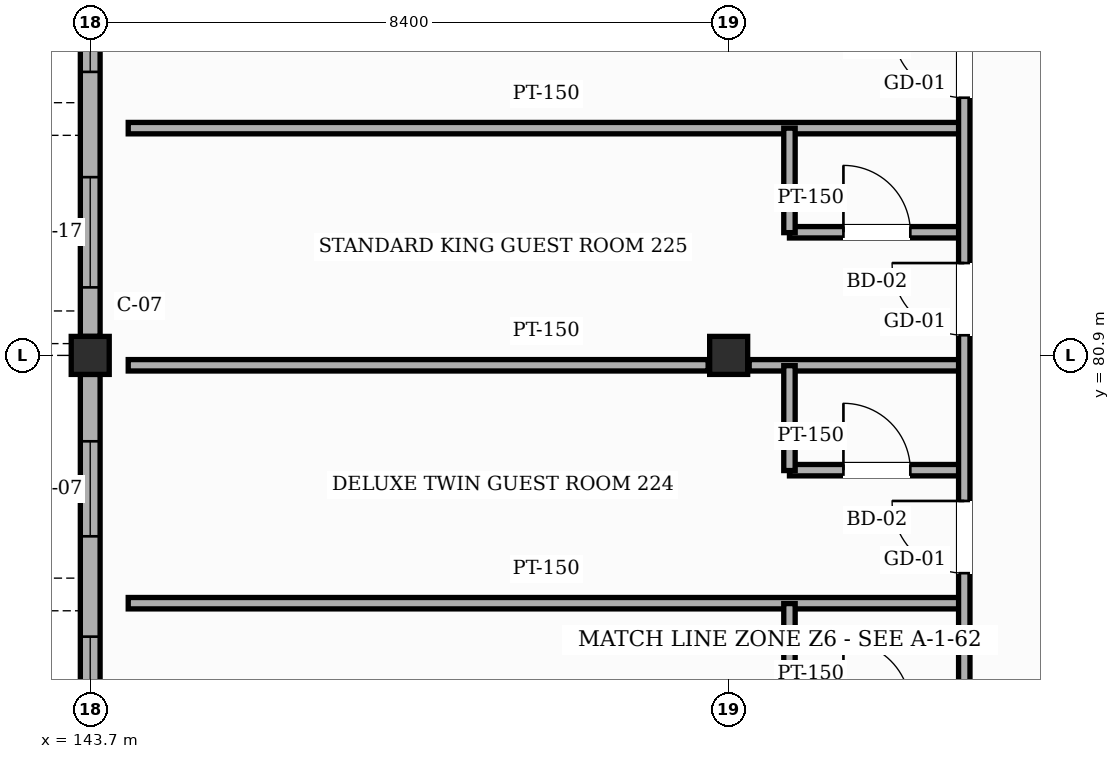
"""IFC4 building model, lengths in metres.
Left out: names, types, materials, properties, quantities, classifications, styles, units other than length and angle.
Written with IfcOpenShell. Run it as: python <this file> out.ifc"""

import sys

from ifc_helpers import new_model, si_unit, direction, frame, frame_2d, origin, origin_2d, place, context, subcontext, project, spatial, rectangle, hollow_rectangle, extrude, element, fill, save


model = new_model("IFC4")
c1 = context("Model", 3, precision=1e-05, world=origin(), true_north=direction((0.0, 1.0)))
c2 = subcontext(c1, "Body", "Model", "MODEL_VIEW")
j1 = project(units=[si_unit("LENGTHUNIT", "METRE"), si_unit("PLANEANGLEUNIT", "RADIAN")], contexts=[c1])
p1 = place(None, origin())
s1 = spatial("IfcSite", under=j1, at=p1, CompositionType="ELEMENT")
p2 = place(p1, origin())
s2 = spatial("IfcBuilding", under=s1, at=p2, CompositionType="ELEMENT")
p3 = place(p2, frame((0.0, 0.0, 35.4)))
s3 = spatial("IfcBuildingStorey", under=s2, at=p3, CompositionType="ELEMENT", Elevation=35.4)
for number, where, z_axis, x_axis in (
    (1, (143.7, 80.9, 0.0), (0.0, 0.0, 1.0), (1.0, 0.0, 0.0)),
    (2, (152.1, 80.9, 0.0), (0.0, 0.0, 1.0), (1.0, 0.0, 0.0)),
):
    element("IfcColumn", number, at=place(p3, frame(where, z_axis=z_axis, x_axis=x_axis)), inside=s3, PredefinedType="COLUMN", context=c2, shape_type="SweptSolid", body=[
        extrude(hollow_rectangle(XDim=0.5, YDim=0.5, WallThickness=0.022, InnerFilletRadius=0.022, OuterFilletRadius=0.044, at=origin_2d()), origin(), (0.0, 0.0, 1.0), 3.6),
    ])
p4 = place(p3, frame((143.7, 73.6, 0.0), z_axis=(0.0, 0.0, 1.0), x_axis=(0.0, 1.0, 0.0)))
e3 = element("IfcWall", 3, at=p4, inside=s3, PredefinedType="SOLIDWALL", context=c2, shape_type="SweptSolid", body=[
    extrude(rectangle(XDim=7.05, YDim=0.26, at=frame_2d((3.525, 0.0))), origin(), (0.0, 0.0, 1.0), 2.805),
])
p5 = place(p4, frame((1.35, 0.0, 0.85)))
e4 = element("IfcOpeningElement", 4, at=p5, cuts=e3, PredefinedType="OPENING", context=c2, shape_type="SweptSolid", body=[
    extrude(rectangle(XDim=2.25, YDim=1.35, at=frame_2d((1.125, 0.675))), frame((0.0, 0.14, 0.0), z_axis=(0.0, -1.0, 0.0), x_axis=(1.0, 0.0, 0.0)), (0.0, 0.0, 1.0), 0.28),
])
p6 = place(p4, frame((4.92, 0.0, 0.85)))
e5 = element("IfcOpeningElement", 5, at=p6, cuts=e3, PredefinedType="OPENING", context=c2, shape_type="SweptSolid", body=[
    extrude(rectangle(XDim=1.25, YDim=1.5, at=frame_2d((0.625, 0.75))), frame((0.0, 0.14, 0.0), z_axis=(0.0, -1.0, 0.0), x_axis=(1.0, 0.0, 0.0)), (0.0, 0.0, 1.0), 0.28),
])
p7 = place(p3, frame((143.7, 81.15, 0.0), z_axis=(0.0, 0.0, 1.0), x_axis=(0.0, 1.0, 0.0)))
e6 = element("IfcWall", 6, at=p7, inside=s3, PredefinedType="SOLIDWALL", context=c2, shape_type="SweptSolid", body=[
    extrude(rectangle(XDim=7.5, YDim=0.26, at=frame_2d((3.75, 0.0))), origin(), (0.0, 0.0, 1.0), 2.805),
])
p8 = place(p7, frame((0.645, 0.0, 0.85)))
e7 = element("IfcOpeningElement", 7, at=p8, cuts=e6, PredefinedType="OPENING", context=c2, shape_type="SweptSolid", body=[
    extrude(rectangle(XDim=1.45, YDim=1.5, at=frame_2d((0.725, 0.75))), frame((0.0, 0.14, 0.0), z_axis=(0.0, -1.0, 0.0), x_axis=(1.0, 0.0, 0.0)), (0.0, 0.0, 1.0), 0.28),
])
p9 = place(p7, frame((3.48, 0.0, 0.85)))
e8 = element("IfcOpeningElement", 8, at=p9, cuts=e6, PredefinedType="OPENING", context=c2, shape_type="SweptSolid", body=[
    extrude(rectangle(XDim=1.65, YDim=1.5, at=frame_2d((0.825, 0.75))), frame((0.0, 0.14, 0.0), z_axis=(0.0, -1.0, 0.0), x_axis=(1.0, 0.0, 0.0)), (0.0, 0.0, 1.0), 0.28),
])
p10 = place(p7, frame((6.26, 0.0, 0.85)))
e9 = element("IfcOpeningElement", 9, at=p10, cuts=e6, PredefinedType="OPENING", context=c2, shape_type="SweptSolid", body=[
    extrude(rectangle(XDim=0.85, YDim=1.35, at=frame_2d((0.425, 0.675))), frame((0.0, 0.14, 0.0), z_axis=(0.0, -1.0, 0.0), x_axis=(1.0, 0.0, 0.0)), (0.0, 0.0, 1.0), 0.28),
])
p11 = place(p3, frame((144.2, 77.64, 0.0), z_axis=(0.0, 0.0, 1.0), x_axis=(1.0, 0.0, 0.0)))
e10 = element("IfcWall", 10, at=p11, inside=s3, PredefinedType="PARTITIONING", context=c2, shape_type="SweptSolid", body=[
    extrude(rectangle(XDim=11.0, YDim=0.15, at=frame_2d((5.5, 0.0))), origin(), (0.0, 0.0, 1.0), 3.365),
])
p12 = place(p3, frame((152.9, 79.39, 0.0), z_axis=(0.0, 0.0, 1.0), x_axis=(1.0, 0.0, 0.0)))
e11 = element("IfcWall", 11, at=p12, inside=s3, PredefinedType="PARTITIONING", context=c2, shape_type="SweptSolid", body=[
    extrude(rectangle(XDim=2.3, YDim=0.15, at=frame_2d((1.15, 0.0))), origin(), (0.0, 0.0, 1.0), 3.365),
])
p13 = place(p12, frame((0.71, 0.0, 0.0)))
e12 = element("IfcOpeningElement", 12, at=p13, cuts=e11, PredefinedType="OPENING", context=c2, shape_type="SweptSolid", body=[
    extrude(rectangle(XDim=0.88, YDim=2.12, at=frame_2d((0.44, 1.06))), frame((0.0, 0.085, 0.0), z_axis=(0.0, -1.0, 0.0), x_axis=(1.0, 0.0, 0.0)), (0.0, 0.0, 1.0), 0.17),
])
p14 = place(p3, frame((144.2, 80.77, 0.0), z_axis=(0.0, 0.0, 1.0), x_axis=(1.0, 0.0, 0.0)))
e13 = element("IfcWall", 13, at=p14, inside=s3, PredefinedType="PARTITIONING", context=c2, shape_type="SweptSolid", body=[
    extrude(rectangle(XDim=7.63, YDim=0.15, at=frame_2d((3.815, 0.0))), origin(), (0.0, 0.0, 1.0), 2.755),
])
p15 = place(p3, frame((152.37, 80.77, 0.0), z_axis=(0.0, 0.0, 1.0), x_axis=(1.0, 0.0, 0.0)))
e14 = element("IfcWall", 14, at=p15, inside=s3, PredefinedType="PARTITIONING", context=c2, shape_type="SweptSolid", body=[
    extrude(rectangle(XDim=2.83, YDim=0.15, at=frame_2d((1.415, 0.0))), origin(), (0.0, 0.0, 1.0), 2.755),
])
p16 = place(p3, frame((152.9, 82.52, 0.0), z_axis=(0.0, 0.0, 1.0), x_axis=(1.0, 0.0, 0.0)))
e15 = element("IfcWall", 15, at=p16, inside=s3, PredefinedType="PARTITIONING", context=c2, shape_type="SweptSolid", body=[
    extrude(rectangle(XDim=2.3, YDim=0.15, at=frame_2d((1.15, 0.0))), origin(), (0.0, 0.0, 1.0), 3.365),
])
p17 = place(p16, frame((0.71, 0.0, 0.0)))
e16 = element("IfcOpeningElement", 16, at=p17, cuts=e15, PredefinedType="OPENING", context=c2, shape_type="SweptSolid", body=[
    extrude(rectangle(XDim=0.88, YDim=2.12, at=frame_2d((0.44, 1.06))), frame((0.0, 0.085, 0.0), z_axis=(0.0, -1.0, 0.0), x_axis=(1.0, 0.0, 0.0)), (0.0, 0.0, 1.0), 0.17),
])
p18 = place(p3, frame((144.2, 83.89, 0.0), z_axis=(0.0, 0.0, 1.0), x_axis=(1.0, 0.0, 0.0)))
e17 = element("IfcWall", 17, at=p18, inside=s3, PredefinedType="PARTITIONING", context=c2, shape_type="SweptSolid", body=[
    extrude(rectangle(XDim=11.0, YDim=0.15, at=frame_2d((5.5, 0.0))), origin(), (0.0, 0.0, 1.0), 3.365),
])
p19 = place(p3, frame((152.9, 76.26, 0.0), z_axis=(0.0, 0.0, 1.0), x_axis=(0.0, 1.0, 0.0)))
e18 = element("IfcWall", 18, at=p19, inside=s3, PredefinedType="PARTITIONING", context=c2, shape_type="SweptSolid", body=[
    extrude(rectangle(XDim=1.375, YDim=0.15, at=frame_2d((0.688, 0.0))), origin(), (0.0, 0.0, 1.0), 3.365),
])
p20 = place(p3, frame((152.9, 79.385, 0.0), z_axis=(0.0, 0.0, 1.0), x_axis=(0.0, 1.0, 0.0)))
e19 = element("IfcWall", 19, at=p20, inside=s3, PredefinedType="PARTITIONING", context=c2, shape_type="SweptSolid", body=[
    extrude(rectangle(XDim=1.38, YDim=0.15, at=frame_2d((0.69, 0.0))), origin(), (0.0, 0.0, 1.0), 3.365),
])
p21 = place(p3, frame((152.9, 82.515, 0.0), z_axis=(0.0, 0.0, 1.0), x_axis=(0.0, 1.0, 0.0)))
e20 = element("IfcWall", 20, at=p21, inside=s3, PredefinedType="PARTITIONING", context=c2, shape_type="SweptSolid", body=[
    extrude(rectangle(XDim=1.375, YDim=0.15, at=frame_2d((0.688, 0.0))), origin(), (0.0, 0.0, 1.0), 3.365),
])
p22 = place(p3, frame((155.2, 62.0, 0.0), z_axis=(0.0, 0.0, 1.0), x_axis=(0.0, 1.0, 0.0)))
e21 = element("IfcWall", 21, at=p22, inside=s3, PredefinedType="PARTITIONING", context=c2, shape_type="SweptSolid", body=[
    extrude(rectangle(XDim=34.4, YDim=0.15, at=frame_2d((17.2, 0.0))), origin(), (0.0, 0.0, 1.0), 3.365),
])
p23 = place(p22, frame((0.325, 0.0, 0.0)))
e22 = element("IfcOpeningElement", 22, at=p23, cuts=e21, PredefinedType="OPENING", context=c2, shape_type="SweptSolid", body=[
    extrude(rectangle(XDim=1.1, YDim=2.2, at=frame_2d((0.55, 1.1))), frame((0.0, 0.085, 0.0), z_axis=(0.0, -1.0, 0.0), x_axis=(1.0, 0.0, 0.0)), (0.0, 0.0, 1.0), 0.17),
])
p24 = place(p22, frame((3.525, 0.0, 0.0)))
e23 = element("IfcOpeningElement", 23, at=p24, cuts=e21, PredefinedType="OPENING", context=c2, shape_type="SweptSolid", body=[
    extrude(rectangle(XDim=0.95, YDim=2.15, at=frame_2d((0.475, 1.075))), frame((0.0, 0.085, 0.0), z_axis=(0.0, -1.0, 0.0), x_axis=(1.0, 0.0, 0.0)), (0.0, 0.0, 1.0), 0.17),
])
p25 = place(p22, frame((6.655, 0.0, 0.0)))
e24 = element("IfcOpeningElement", 24, at=p25, cuts=e21, PredefinedType="OPENING", context=c2, shape_type="SweptSolid", body=[
    extrude(rectangle(XDim=0.95, YDim=2.15, at=frame_2d((0.475, 1.075))), frame((0.0, 0.085, 0.0), z_axis=(0.0, -1.0, 0.0), x_axis=(1.0, 0.0, 0.0)), (0.0, 0.0, 1.0), 0.17),
])
p26 = place(p22, frame((9.78, 0.0, 0.0)))
e25 = element("IfcOpeningElement", 25, at=p26, cuts=e21, PredefinedType="OPENING", context=c2, shape_type="SweptSolid", body=[
    extrude(rectangle(XDim=0.95, YDim=2.15, at=frame_2d((0.475, 1.075))), frame((0.0, 0.085, 0.0), z_axis=(0.0, -1.0, 0.0), x_axis=(1.0, 0.0, 0.0)), (0.0, 0.0, 1.0), 0.17),
])
p27 = place(p22, frame((12.91, 0.0, 0.0)))
e26 = element("IfcOpeningElement", 26, at=p27, cuts=e21, PredefinedType="OPENING", context=c2, shape_type="SweptSolid", body=[
    extrude(rectangle(XDim=0.95, YDim=2.15, at=frame_2d((0.475, 1.075))), frame((0.0, 0.085, 0.0), z_axis=(0.0, -1.0, 0.0), x_axis=(1.0, 0.0, 0.0)), (0.0, 0.0, 1.0), 0.17),
])
p28 = place(p22, frame((16.035, 0.0, 0.0)))
e27 = element("IfcOpeningElement", 27, at=p28, cuts=e21, PredefinedType="OPENING", context=c2, shape_type="SweptSolid", body=[
    extrude(rectangle(XDim=0.95, YDim=2.15, at=frame_2d((0.475, 1.075))), frame((0.0, 0.085, 0.0), z_axis=(0.0, -1.0, 0.0), x_axis=(1.0, 0.0, 0.0)), (0.0, 0.0, 1.0), 0.17),
])
p29 = place(p22, frame((19.165, 0.0, 0.0)))
e28 = element("IfcOpeningElement", 28, at=p29, cuts=e21, PredefinedType="OPENING", context=c2, shape_type="SweptSolid", body=[
    extrude(rectangle(XDim=0.95, YDim=2.15, at=frame_2d((0.475, 1.075))), frame((0.0, 0.085, 0.0), z_axis=(0.0, -1.0, 0.0), x_axis=(1.0, 0.0, 0.0)), (0.0, 0.0, 1.0), 0.17),
])
p30 = place(p22, frame((22.29, 0.0, 0.0)))
e29 = element("IfcOpeningElement", 29, at=p30, cuts=e21, PredefinedType="OPENING", context=c2, shape_type="SweptSolid", body=[
    extrude(rectangle(XDim=0.95, YDim=2.15, at=frame_2d((0.475, 1.075))), frame((0.0, 0.085, 0.0), z_axis=(0.0, -1.0, 0.0), x_axis=(1.0, 0.0, 0.0)), (0.0, 0.0, 1.0), 0.17),
])
p31 = place(p22, frame((25.42, 0.0, 0.0)))
e30 = element("IfcOpeningElement", 30, at=p31, cuts=e21, PredefinedType="OPENING", context=c2, shape_type="SweptSolid", body=[
    extrude(rectangle(XDim=0.95, YDim=2.15, at=frame_2d((0.475, 1.075))), frame((0.0, 0.085, 0.0), z_axis=(0.0, -1.0, 0.0), x_axis=(1.0, 0.0, 0.0)), (0.0, 0.0, 1.0), 0.17),
])
p32 = place(p22, frame((28.545, 0.0, 0.0)))
e31 = element("IfcOpeningElement", 31, at=p32, cuts=e21, PredefinedType="OPENING", context=c2, shape_type="SweptSolid", body=[
    extrude(rectangle(XDim=0.95, YDim=2.15, at=frame_2d((0.475, 1.075))), frame((0.0, 0.085, 0.0), z_axis=(0.0, -1.0, 0.0), x_axis=(1.0, 0.0, 0.0)), (0.0, 0.0, 1.0), 0.17),
])
p33 = place(p22, frame((31.675, 0.0, 0.0)))
e32 = element("IfcOpeningElement", 32, at=p33, cuts=e21, PredefinedType="OPENING", context=c2, shape_type="SweptSolid", body=[
    extrude(rectangle(XDim=0.95, YDim=2.15, at=frame_2d((0.475, 1.075))), frame((0.0, 0.085, 0.0), z_axis=(0.0, -1.0, 0.0), x_axis=(1.0, 0.0, 0.0)), (0.0, 0.0, 1.0), 0.17),
])
p34 = place(p5, origin())
e33 = element("IfcWindow", 33, at=p34, inside=s3, PartitioningType="SINGLE_PANEL", PredefinedType="WINDOW", context=c2, shape_type="SweptSolid", body=[
    extrude(rectangle(XDim=2.25, YDim=1.35, at=frame_2d((1.125, 0.675))), frame((0.0, 0.03, 0.0), z_axis=(0.0, -1.0, 0.0), x_axis=(1.0, 0.0, 0.0)), (0.0, 0.0, 1.0), 0.06),
])
fill(e4, e33)
p35 = place(p6, origin())
e34 = element("IfcWindow", 34, at=p35, inside=s3, PartitioningType="SINGLE_PANEL", PredefinedType="WINDOW", context=c2, shape_type="SweptSolid", body=[
    extrude(rectangle(XDim=1.25, YDim=1.5, at=frame_2d((0.625, 0.75))), frame((0.0, 0.03, 0.0), z_axis=(0.0, -1.0, 0.0), x_axis=(1.0, 0.0, 0.0)), (0.0, 0.0, 1.0), 0.06),
])
fill(e5, e34)
p36 = place(p8, origin())
e35 = element("IfcWindow", 35, at=p36, inside=s3, PartitioningType="SINGLE_PANEL", PredefinedType="WINDOW", context=c2, shape_type="SweptSolid", body=[
    extrude(rectangle(XDim=1.45, YDim=1.5, at=frame_2d((0.725, 0.75))), frame((0.0, 0.03, 0.0), z_axis=(0.0, -1.0, 0.0), x_axis=(1.0, 0.0, 0.0)), (0.0, 0.0, 1.0), 0.06),
])
fill(e7, e35)
p37 = place(p9, origin())
e36 = element("IfcWindow", 36, at=p37, inside=s3, PartitioningType="SINGLE_PANEL", PredefinedType="WINDOW", context=c2, shape_type="SweptSolid", body=[
    extrude(rectangle(XDim=1.65, YDim=1.5, at=frame_2d((0.825, 0.75))), frame((0.0, 0.03, 0.0), z_axis=(0.0, -1.0, 0.0), x_axis=(1.0, 0.0, 0.0)), (0.0, 0.0, 1.0), 0.06),
])
fill(e8, e36)
p38 = place(p28, origin())
e37 = element("IfcDoor", 37, at=p38, inside=s3, OperationType="SINGLE_SWING_RIGHT", PredefinedType="DOOR", context=c2, shape_type="SweptSolid", body=[
    extrude(rectangle(XDim=0.95, YDim=2.15, at=frame_2d((0.475, 1.075))), frame((0.0, 0.025, 0.0), z_axis=(0.0, -1.0, 0.0), x_axis=(1.0, 0.0, 0.0)), (0.0, 0.0, 1.0), 0.05),
])
fill(e27, e37)
p39 = place(p13, origin())
e38 = element("IfcDoor", 38, at=p39, inside=s3, OperationType="SINGLE_SWING_LEFT", PredefinedType="DOOR", context=c2, shape_type="SweptSolid", body=[
    extrude(rectangle(XDim=0.88, YDim=2.12, at=frame_2d((0.44, 1.06))), frame((0.0, 0.025, 0.0), z_axis=(0.0, -1.0, 0.0), x_axis=(1.0, 0.0, 0.0)), (0.0, 0.0, 1.0), 0.05),
])
fill(e12, e38)
p40 = place(p29, origin())
e39 = element("IfcDoor", 39, at=p40, inside=s3, OperationType="SINGLE_SWING_RIGHT", PredefinedType="DOOR", context=c2, shape_type="SweptSolid", body=[
    extrude(rectangle(XDim=0.95, YDim=2.15, at=frame_2d((0.475, 1.075))), frame((0.0, 0.025, 0.0), z_axis=(0.0, -1.0, 0.0), x_axis=(1.0, 0.0, 0.0)), (0.0, 0.0, 1.0), 0.05),
])
fill(e28, e39)
p41 = place(p17, origin())
e40 = element("IfcDoor", 40, at=p41, inside=s3, OperationType="SINGLE_SWING_LEFT", PredefinedType="DOOR", context=c2, shape_type="SweptSolid", body=[
    extrude(rectangle(XDim=0.88, YDim=2.12, at=frame_2d((0.44, 1.06))), frame((0.0, 0.025, 0.0), z_axis=(0.0, -1.0, 0.0), x_axis=(1.0, 0.0, 0.0)), (0.0, 0.0, 1.0), 0.05),
])
fill(e16, e40)
p42 = place(p30, origin())
e41 = element("IfcDoor", 41, at=p42, inside=s3, OperationType="SINGLE_SWING_RIGHT", PredefinedType="DOOR", context=c2, shape_type="SweptSolid", body=[
    extrude(rectangle(XDim=0.95, YDim=2.15, at=frame_2d((0.475, 1.075))), frame((0.0, 0.025, 0.0), z_axis=(0.0, -1.0, 0.0), x_axis=(1.0, 0.0, 0.0)), (0.0, 0.0, 1.0), 0.05),
])
fill(e29, e41)
save(model, sys.argv[1])
